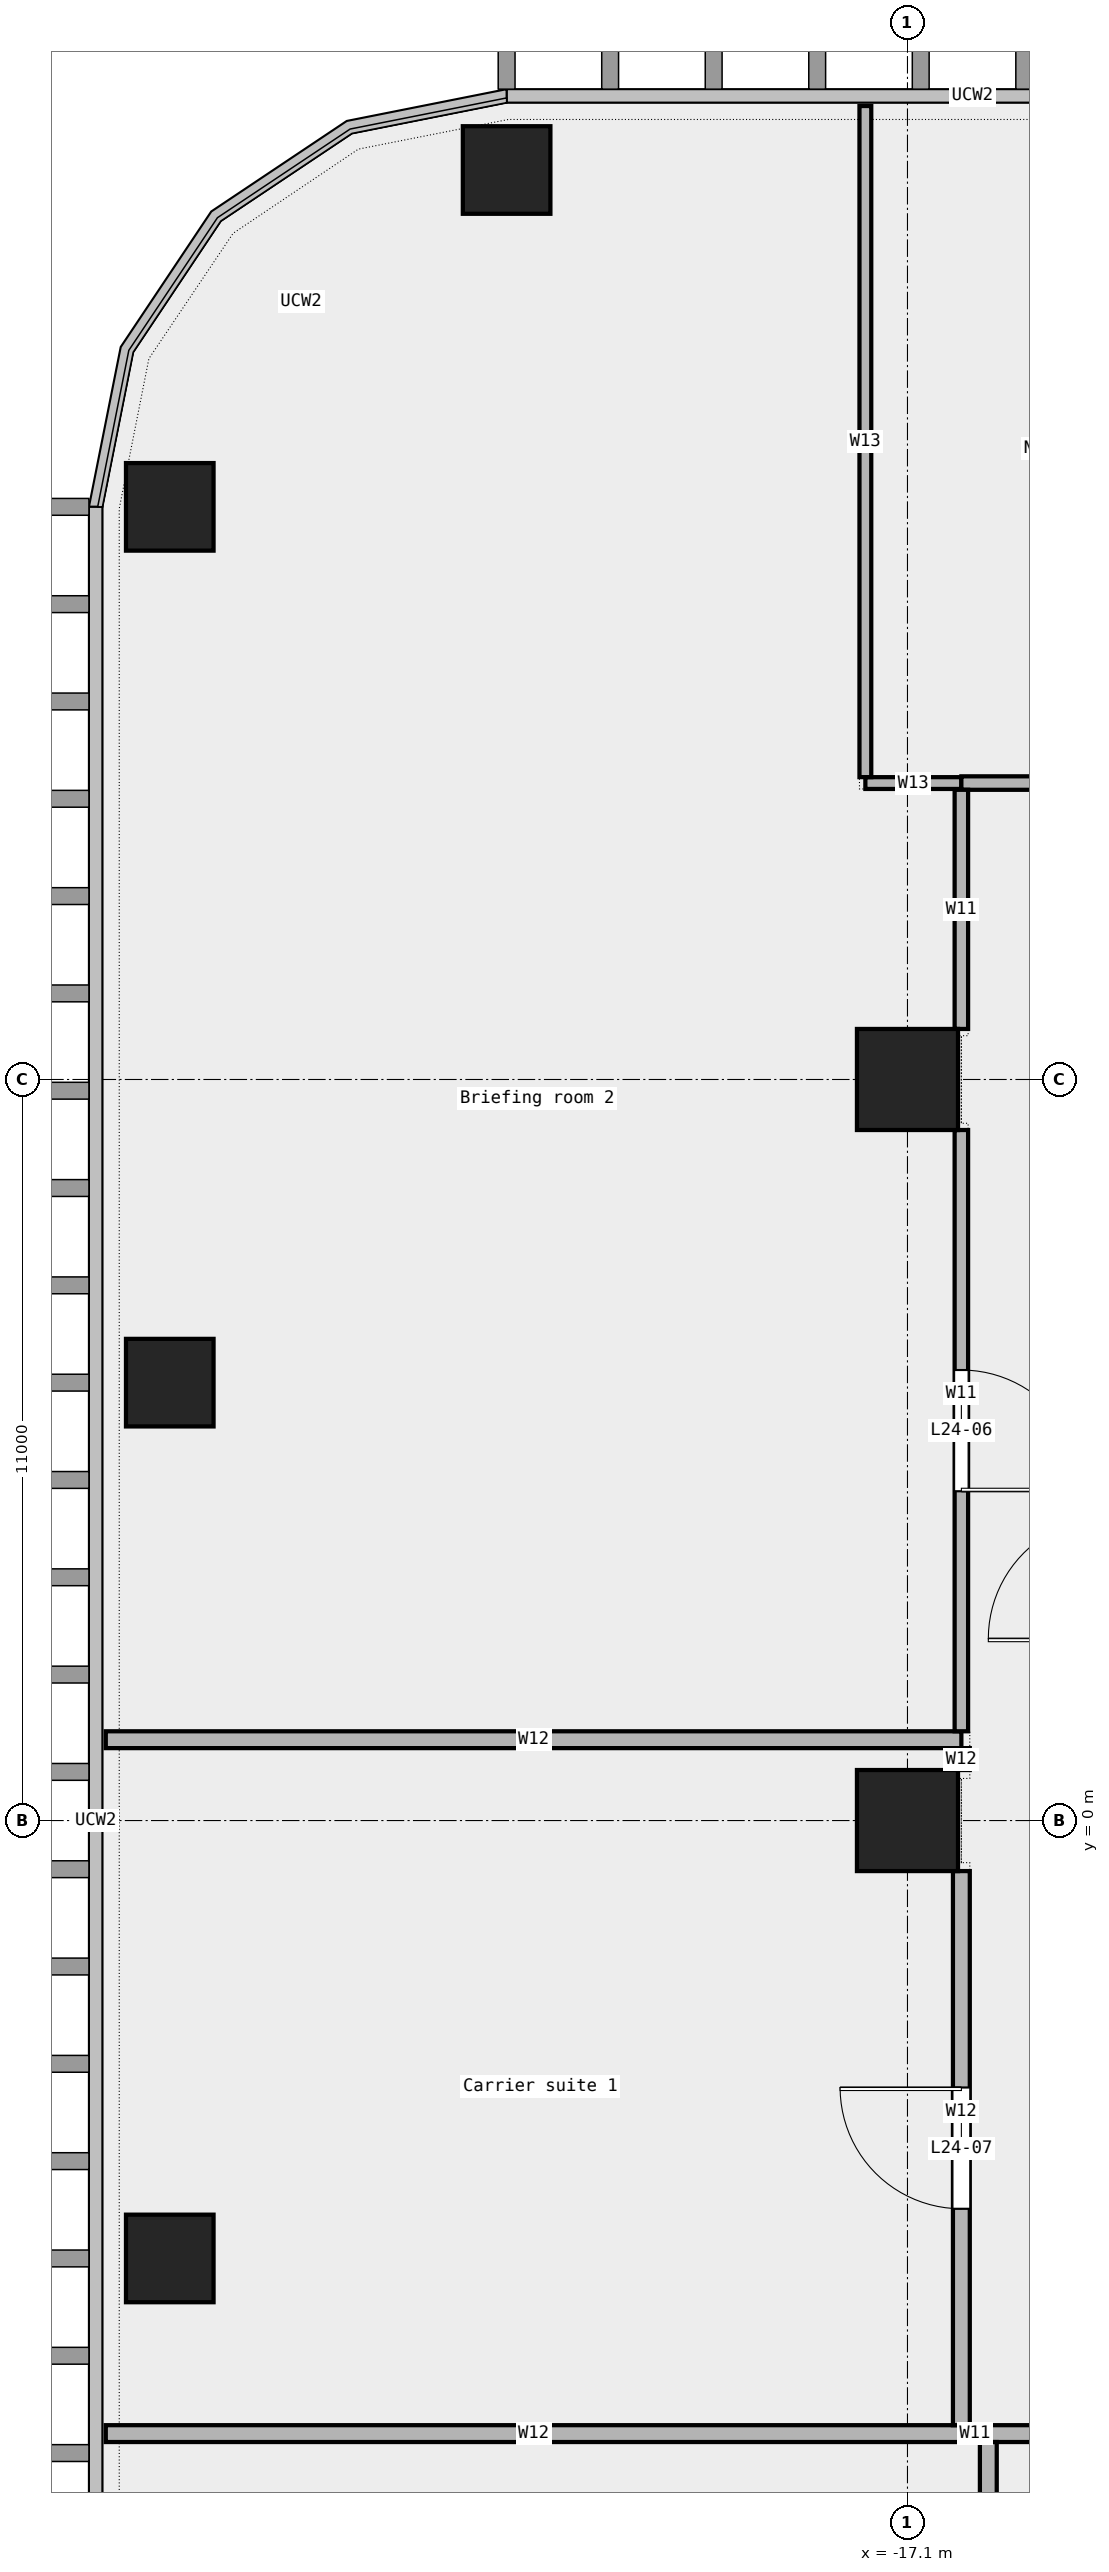
"""IFC4 building model, lengths in metres.
Left out: names, types, materials, properties, quantities, classifications, styles, units other than length and angle.
Written with IfcOpenShell. Run it as: python <this file> out.ifc"""

import sys

from ifc_helpers import new_model, si_unit, direction, frame, frame_2d, origin, origin_2d, place, context, subcontext, project, spatial, rectangle, extrude, element, fill, save


model = new_model("IFC4")
c1 = context("Model", 3, precision=1e-05, world=origin(), true_north=direction((0.0, 1.0)))
c2 = subcontext(c1, "Body", "Model", "MODEL_VIEW")
j1 = project(units=[si_unit("LENGTHUNIT", "METRE"), si_unit("PLANEANGLEUNIT", "RADIAN")], contexts=[c1])
p1 = place(None, origin())
s1 = spatial("IfcSite", under=j1, at=p1, CompositionType="ELEMENT")
p2 = place(p1, origin())
s2 = spatial("IfcBuilding", under=s1, at=p2, CompositionType="ELEMENT")
p3 = place(p2, frame((0.0, 0.0, 121.6)))
s3 = spatial("IfcBuildingStorey", under=s2, at=p3, CompositionType="ELEMENT", Elevation=121.6)
for number, where, z_axis, x_axis in (
    (1, (-23.05, 24.5, 0.0), (0.0, 0.0, 1.0), (1.0, 0.0, 0.0)),
    (2, (-28.05, 19.5, 0.0), (0.0, 0.0, 1.0), (1.0, 0.0, 0.0)),
    (3, (-28.05, 6.5, 0.0), (0.0, 0.0, 1.0), (1.0, 0.0, 0.0)),
    (4, (-28.05, -6.5, 0.0), (0.0, 0.0, 1.0), (1.0, 0.0, 0.0)),
):
    element("IfcColumn", number, at=place(p3, frame(where, z_axis=z_axis, x_axis=x_axis)), inside=s3, PredefinedType="COLUMN", context=c2, shape_type="SweptSolid", body=[
        extrude(rectangle(XDim=1.3, YDim=1.3, at=origin_2d()), origin(), (0.0, 0.0, 1.0), 4.05),
    ])
for number, where, z_axis, x_axis in (
    (5, (-17.1, 0.0, 0.0), (0.0, 0.0, 1.0), (1.0, 0.0, 0.0)),
    (6, (-17.1, 11.0, 0.0), (0.0, 0.0, 1.0), (1.0, 0.0, 0.0)),
):
    element("IfcColumn", number, at=place(p3, frame(where, z_axis=z_axis, x_axis=x_axis)), inside=s3, PredefinedType="COLUMN", context=c2, shape_type="SweptSolid", body=[
        extrude(rectangle(XDim=1.5, YDim=1.5, at=origin_2d()), origin(), (0.0, 0.0, 1.0), 4.05),
    ])
p4 = place(p3, frame((-16.3, -9.1, 0.0), z_axis=(0.0, 0.0, 1.0), x_axis=(1.0, 0.0, 0.0)))
e7 = element("IfcWall", 7, at=p4, inside=s3, PredefinedType="PARTITIONING", context=c2, shape_type="SweptSolid", body=[
    extrude(rectangle(XDim=0.4, YDim=0.2, at=frame_2d((0.2, 0.0))), origin(), (0.0, 0.0, 1.0), 4.05),
])
p5 = place(p3, frame((-29.0, -9.1, 0.0), z_axis=(0.0, 0.0, 1.0), x_axis=(1.0, 0.0, 0.0)))
e8 = element("IfcWall", 8, at=p5, inside=s3, PredefinedType="PARTITIONING", context=c2, shape_type="SweptSolid", body=[
    extrude(rectangle(XDim=12.7, YDim=0.25, at=frame_2d((6.35, 0.0))), origin(), (0.0, 0.0, 1.0), 4.05),
])
p6 = place(p3, frame((-15.9, -9.1, 0.0), z_axis=(0.0, 0.0, 1.0), x_axis=(1.0, 0.0, 0.0)))
e9 = element("IfcWall", 9, at=p6, inside=s3, PredefinedType="PARTITIONING", context=c2, shape_type="SweptSolid", body=[
    extrude(rectangle(XDim=6.935, YDim=0.25, at=frame_2d((3.467, 0.0))), origin(), (0.0, 0.0, 1.0), 4.05),
])
p7 = place(p6, frame((3.018, 0.0, 0.0)))
e10 = element("IfcOpeningElement", 10, at=p7, cuts=e9, PredefinedType="OPENING", context=c2, shape_type="SweptSolid", body=[
    extrude(rectangle(XDim=0.9, YDim=2.1, at=frame_2d((0.45, 1.05))), frame((0.0, 0.137, 0.0), z_axis=(0.0, -1.0, 0.0), x_axis=(1.0, 0.0, 0.0)), (0.0, 0.0, 1.0), 0.274),
])
p8 = place(p3, frame((-29.0, 1.2, 0.0), z_axis=(0.0, 0.0, 1.0), x_axis=(1.0, 0.0, 0.0)))
e11 = element("IfcWall", 11, at=p8, inside=s3, PredefinedType="PARTITIONING", context=c2, shape_type="SweptSolid", body=[
    extrude(rectangle(XDim=12.7, YDim=0.25, at=frame_2d((6.35, 0.0))), origin(), (0.0, 0.0, 1.0), 4.05),
])
p9 = place(p3, frame((-17.725, 15.4, 0.0), z_axis=(0.0, 0.0, 1.0), x_axis=(1.0, 0.0, 0.0)))
e12 = element("IfcWall", 12, at=p9, inside=s3, PredefinedType="PARTITIONING", context=c2, shape_type="SweptSolid", body=[
    extrude(rectangle(XDim=1.425, YDim=0.175, at=frame_2d((0.712, 0.0))), origin(), (0.0, 0.0, 1.0), 4.05),
])
p10 = place(p3, frame((-16.3, 15.4, 0.0), z_axis=(0.0, 0.0, 1.0), x_axis=(1.0, 0.0, 0.0)))
e13 = element("IfcWall", 13, at=p10, inside=s3, PredefinedType="PARTITIONING", context=c2, shape_type="SweptSolid", body=[
    extrude(rectangle(XDim=20.91, YDim=0.2, at=frame_2d((10.455, 0.0))), origin(), (0.0, 0.0, 1.0), 4.05),
])
p11 = place(p10, frame((13.245, 0.0, 0.0)))
e14 = element("IfcOpeningElement", 14, at=p11, cuts=e13, PredefinedType="OPENING", context=c2, shape_type="SweptSolid", body=[
    extrude(rectangle(XDim=1.5, YDim=2.1, at=frame_2d((0.75, 1.05))), frame((0.0, 0.112, 0.0), z_axis=(0.0, -1.0, 0.0), x_axis=(1.0, 0.0, 0.0)), (0.0, 0.0, 1.0), 0.224),
])
p12 = place(p10, frame((2.387, 0.0, 0.0)))
e15 = element("IfcOpeningElement", 15, at=p12, cuts=e13, PredefinedType="OPENING", context=c2, shape_type="SweptSolid", body=[
    extrude(rectangle(XDim=1.2, YDim=2.1, at=frame_2d((0.6, 1.05))), frame((0.0, 0.112, 0.0), z_axis=(0.0, -1.0, 0.0), x_axis=(1.0, 0.0, 0.0)), (0.0, 0.0, 1.0), 0.224),
])
p13 = place(p3, frame((-17.725, 15.488, 0.0), z_axis=(0.0, 0.0, 1.0), x_axis=(0.0, 1.0, 0.0)))
e16 = element("IfcWall", 16, at=p13, inside=s3, PredefinedType="PARTITIONING", context=c2, shape_type="SweptSolid", body=[
    extrude(rectangle(XDim=9.962, YDim=0.175, at=frame_2d((4.981, 0.0))), origin(), (0.0, 0.0, 1.0), 4.05),
])
p14 = place(p3, frame((-16.3, 1.325, 0.0), z_axis=(0.0, 0.0, 1.0), x_axis=(0.0, 1.0, 0.0)))
e17 = element("IfcWall", 17, at=p14, inside=s3, PredefinedType="PARTITIONING", context=c2, shape_type="SweptSolid", body=[
    extrude(rectangle(XDim=8.925, YDim=0.2, at=frame_2d((4.462, 0.0))), origin(), (0.0, 0.0, 1.0), 4.05),
])
p15 = place(p14, frame((3.562, 0.0, 0.0)))
e18 = element("IfcOpeningElement", 18, at=p15, cuts=e17, PredefinedType="OPENING", context=c2, shape_type="SweptSolid", body=[
    extrude(rectangle(XDim=1.8, YDim=2.1, at=frame_2d((0.9, 1.05))), frame((0.0, 0.112, 0.0), z_axis=(0.0, -1.0, 0.0), x_axis=(1.0, 0.0, 0.0)), (0.0, 0.0, 1.0), 0.224),
])
p16 = place(p3, frame((-16.3, 11.75, 0.0), z_axis=(0.0, 0.0, 1.0), x_axis=(0.0, 1.0, 0.0)))
e19 = element("IfcWall", 19, at=p16, inside=s3, PredefinedType="PARTITIONING", context=c2, shape_type="SweptSolid", body=[
    extrude(rectangle(XDim=3.55, YDim=0.2, at=frame_2d((1.775, 0.0))), origin(), (0.0, 0.0, 1.0), 4.05),
])
p17 = place(p3, frame((-16.3, -8.975, 0.0), z_axis=(0.0, 0.0, 1.0), x_axis=(0.0, 1.0, 0.0)))
e20 = element("IfcWall", 20, at=p17, inside=s3, PredefinedType="PARTITIONING", context=c2, shape_type="SweptSolid", body=[
    extrude(rectangle(XDim=8.225, YDim=0.25, at=frame_2d((4.113, 0.0))), origin(), (0.0, 0.0, 1.0), 4.05),
])
p18 = place(p17, frame((3.212, 0.0, 0.0)))
e21 = element("IfcOpeningElement", 21, at=p18, cuts=e20, PredefinedType="OPENING", context=c2, shape_type="SweptSolid", body=[
    extrude(rectangle(XDim=1.8, YDim=2.1, at=frame_2d((0.9, 1.05))), frame((0.0, 0.137, 0.0), z_axis=(0.0, -1.0, 0.0), x_axis=(1.0, 0.0, 0.0)), (0.0, 0.0, 1.0), 0.274),
])
p19 = place(p3, frame((-16.3, 0.75, 0.0), z_axis=(0.0, 0.0, 1.0), x_axis=(0.0, 1.0, 0.0)))
e22 = element("IfcWall", 22, at=p19, inside=s3, PredefinedType="PARTITIONING", context=c2, shape_type="SweptSolid", body=[
    extrude(rectangle(XDim=0.325, YDim=0.25, at=frame_2d((0.163, 0.0))), origin(), (0.0, 0.0, 1.0), 4.05),
])
p20 = place(p3, frame((-15.9, -14.325, 0.0), z_axis=(0.0, 0.0, 1.0), x_axis=(0.0, 1.0, 0.0)))
e23 = element("IfcWall", 23, at=p20, inside=s3, PredefinedType="PARTITIONING", context=c2, shape_type="SweptSolid", body=[
    extrude(rectangle(XDim=5.1, YDim=0.25, at=frame_2d((2.55, 0.0))), origin(), (0.0, 0.0, 1.0), 4.05),
])
p21 = place(p15, origin())
e24 = element("IfcDoor", 24, at=p21, inside=s3, OperationType="DOUBLE_DOOR_SINGLE_SWING", PredefinedType="DOOR", context=c2, shape_type="SweptSolid", body=[
    extrude(rectangle(XDim=1.8, YDim=2.1, at=frame_2d((0.9, 1.05))), frame((0.0, 0.025, 0.0), z_axis=(0.0, -1.0, 0.0), x_axis=(1.0, 0.0, 0.0)), (0.0, 0.0, 1.0), 0.05),
])
fill(e18, e24)
p22 = place(p18, origin())
e25 = element("IfcDoor", 25, at=p22, inside=s3, OperationType="DOUBLE_DOOR_SINGLE_SWING", PredefinedType="DOOR", context=c2, shape_type="SweptSolid", body=[
    extrude(rectangle(XDim=1.8, YDim=2.1, at=frame_2d((0.9, 1.05))), frame((0.0, 0.025, 0.0), z_axis=(0.0, -1.0, 0.0), x_axis=(1.0, 0.0, 0.0)), (0.0, 0.0, 1.0), 0.05),
])
fill(e21, e25)
save(model, sys.argv[1])
